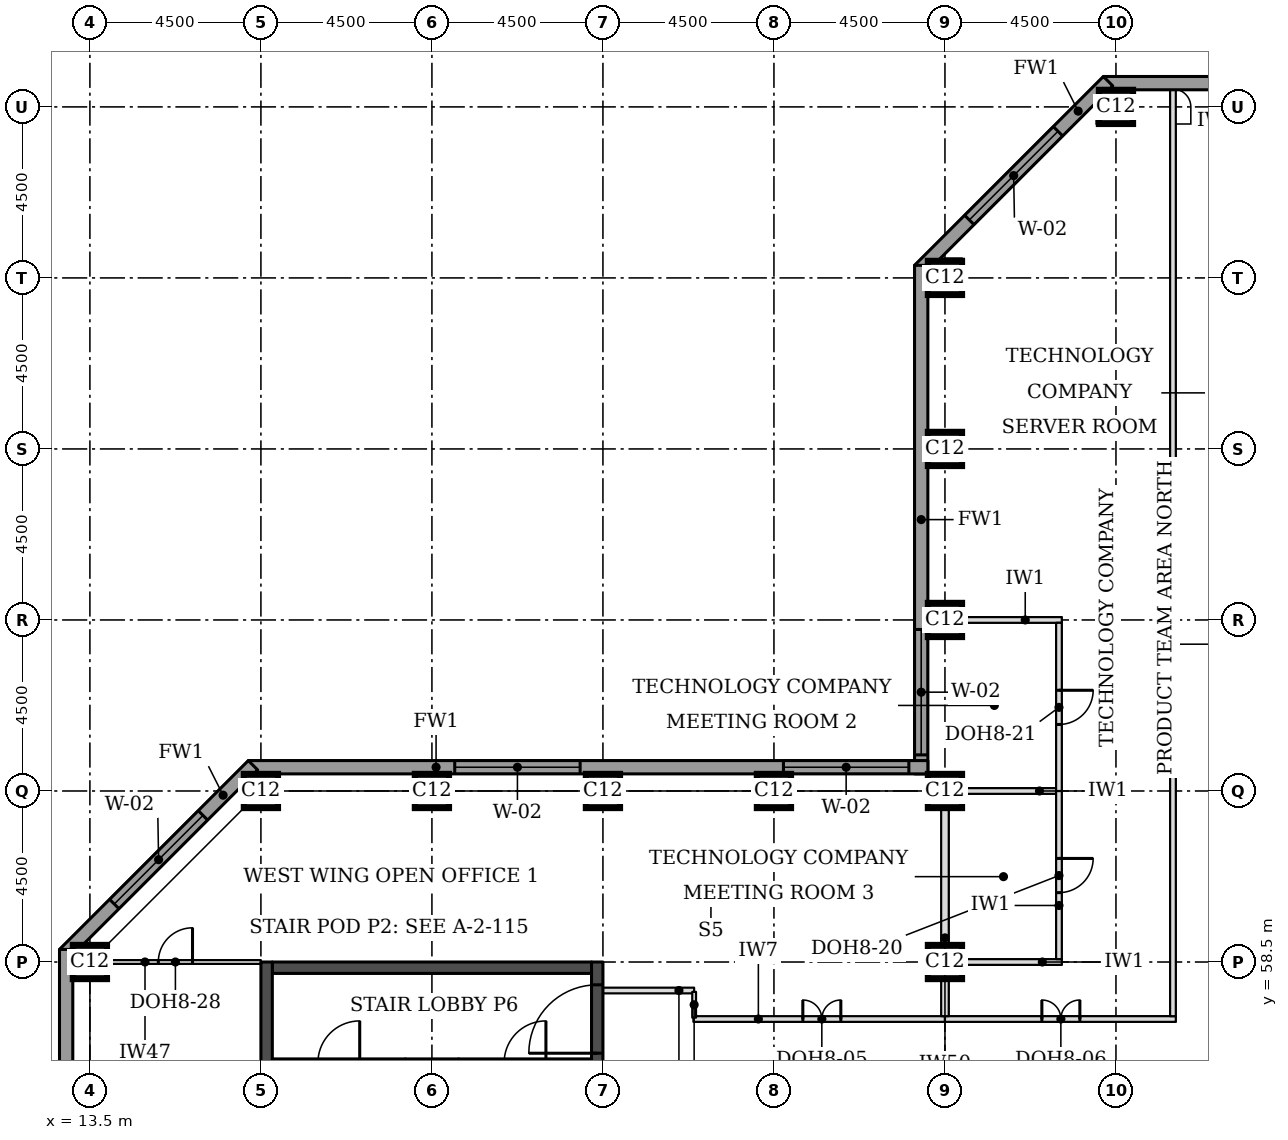
"""IFC4 building model, lengths in metres.
Left out: names, types, materials, properties, quantities, classifications, styles, units other than length and angle.
Written with IfcOpenShell. Run it as: python <this file> out.ifc"""

import sys

from ifc_helpers import new_model, si_unit, direction, frame, frame_2d, origin, origin_2d, place, context, subcontext, project, spatial, rectangle, extrude, element, fill, save


model = new_model("IFC4")
c1 = context("Model", 3, precision=1e-05, world=origin(), true_north=direction((0.0, 1.0)))
c2 = subcontext(c1, "Body", "Model", "MODEL_VIEW")
j1 = project(units=[si_unit("LENGTHUNIT", "METRE"), si_unit("PLANEANGLEUNIT", "RADIAN")], contexts=[c1])
p1 = place(None, origin())
s1 = spatial("IfcSite", under=j1, at=p1, CompositionType="ELEMENT")
p2 = place(p1, origin())
s2 = spatial("IfcBuilding", under=s1, at=p2, CompositionType="ELEMENT")
p3 = place(p2, frame((0.0, 0.0, 203.2)))
s3 = spatial("IfcBuildingStorey", under=s2, at=p3, CompositionType="ELEMENT", Elevation=203.2)
for number, where, z_axis, x_axis in (
    (1, (13.5, 58.5, 0.0), (0.0, 0.0, 1.0), (1.0, 0.0, 0.0)),
    (2, (36.0, 58.5, 0.0), (0.0, 0.0, 1.0), (1.0, 0.0, 0.0)),
    (3, (18.0, 63.0, 0.0), (0.0, 0.0, 1.0), (1.0, 0.0, 0.0)),
    (4, (22.5, 63.0, 0.0), (0.0, 0.0, 1.0), (1.0, 0.0, 0.0)),
    (5, (27.0, 63.0, 0.0), (0.0, 0.0, 1.0), (1.0, 0.0, 0.0)),
    (6, (31.5, 63.0, 0.0), (0.0, 0.0, 1.0), (1.0, 0.0, 0.0)),
    (7, (36.0, 63.0, 0.0), (0.0, 0.0, 1.0), (1.0, 0.0, 0.0)),
    (8, (36.0, 67.5, 0.0), (0.0, 0.0, 1.0), (1.0, 0.0, 0.0)),
    (9, (36.0, 72.0, 0.0), (0.0, 0.0, 1.0), (1.0, 0.0, 0.0)),
    (10, (36.0, 76.5, 0.0), (0.0, 0.0, 1.0), (1.0, 0.0, 0.0)),
    (11, (40.5, 81.0, 0.0), (0.0, 0.0, 1.0), (1.0, 0.0, 0.0)),
):
    element("IfcColumn", number, at=place(p3, frame(where, z_axis=z_axis, x_axis=x_axis)), inside=s3, PredefinedType="COLUMN", context=c2, shape_type="SweptSolid", body=[
        extrude(rectangle(XDim=0.9, YDim=0.9, at=origin_2d()), origin(), (0.0, 0.0, 1.0), 3.7),
    ])
p4 = place(p3, frame((18.3, 58.35, 0.0), z_axis=(0.0, 0.0, 1.0), x_axis=(1.0, 0.0, 0.0)))
e12 = element("IfcWall", 12, at=p4, inside=s3, PredefinedType="SHEAR", context=c2, shape_type="SweptSolid", body=[
    extrude(rectangle(XDim=8.4, YDim=0.3, at=frame_2d((4.2, 0.0))), origin(), (0.0, 0.0, 1.0), 3.7),
])
p5 = place(p3, frame((18.15, 49.5, 0.0), z_axis=(0.0, 0.0, 1.0), x_axis=(0.0, 1.0, 0.0)))
e13 = element("IfcWall", 13, at=p5, inside=s3, PredefinedType="SHEAR", context=c2, shape_type="SweptSolid", body=[
    extrude(rectangle(XDim=9.0, YDim=0.3, at=frame_2d((4.5, 0.0))), origin(), (0.0, 0.0, 1.0), 3.7),
])
p6 = place(p3, frame((26.85, 49.5, 0.0), z_axis=(0.0, 0.0, 1.0), x_axis=(0.0, 1.0, 0.0)))
e14 = element("IfcWall", 14, at=p6, inside=s3, PredefinedType="SHEAR", context=c2, shape_type="SweptSolid", body=[
    extrude(rectangle(XDim=9.0, YDim=0.3, at=frame_2d((4.5, 0.0))), origin(), (0.0, 0.0, 1.0), 3.7),
])
p7 = place(p6, frame((6.6, 0.0, 0.0)))
e15 = element("IfcOpeningElement", 15, at=p7, cuts=e14, PredefinedType="OPENING", context=c2, shape_type="SweptSolid", body=[
    extrude(rectangle(XDim=1.8, YDim=2.1, at=frame_2d((0.9, 1.05))), frame((0.0, 0.16, 0.0), z_axis=(0.0, -1.0, 0.0), x_axis=(1.0, 0.0, 0.0)), (0.0, 0.0, 1.0), 0.32),
])
p8 = place(p3, frame((72.331, 81.625, 0.0), z_axis=(0.0, 0.0, 1.0), x_axis=(-1.0, 0.0, 0.0)))
e16 = element("IfcWall", 16, at=p8, inside=s3, PredefinedType="STANDARD", context=c2, shape_type="SweptSolid", body=[
    extrude(rectangle(XDim=32.163, YDim=0.35, at=frame_2d((16.081, 0.0))), origin(), (0.0, 0.0, 1.0), 3.525),
])
p9 = place(p8, frame((5.431, 0.0, 0.9)))
e17 = element("IfcOpeningElement", 17, at=p9, cuts=e16, PredefinedType="OPENING", context=c2, shape_type="SweptSolid", body=[
    extrude(rectangle(XDim=3.3, YDim=1.9, at=frame_2d((1.65, 0.95))), frame((0.0, 0.185, 0.0), z_axis=(0.0, -1.0, 0.0), x_axis=(1.0, 0.0, 0.0)), (0.0, 0.0, 1.0), 0.37),
])
p10 = place(p8, frame((9.931, 0.0, 0.9)))
e18 = element("IfcOpeningElement", 18, at=p10, cuts=e16, PredefinedType="OPENING", context=c2, shape_type="SweptSolid", body=[
    extrude(rectangle(XDim=3.3, YDim=1.9, at=frame_2d((1.65, 0.95))), frame((0.0, 0.185, 0.0), z_axis=(0.0, -1.0, 0.0), x_axis=(1.0, 0.0, 0.0)), (0.0, 0.0, 1.0), 0.37),
])
p11 = place(p8, frame((14.431, 0.0, 0.9)))
e19 = element("IfcOpeningElement", 19, at=p11, cuts=e16, PredefinedType="OPENING", context=c2, shape_type="SweptSolid", body=[
    extrude(rectangle(XDim=3.3, YDim=1.9, at=frame_2d((1.65, 0.95))), frame((0.0, 0.185, 0.0), z_axis=(0.0, -1.0, 0.0), x_axis=(1.0, 0.0, 0.0)), (0.0, 0.0, 1.0), 0.37),
])
p12 = place(p8, frame((18.931, 0.0, 0.9)))
e20 = element("IfcOpeningElement", 20, at=p12, cuts=e16, PredefinedType="OPENING", context=c2, shape_type="SweptSolid", body=[
    extrude(rectangle(XDim=3.3, YDim=1.9, at=frame_2d((1.65, 0.95))), frame((0.0, 0.185, 0.0), z_axis=(0.0, -1.0, 0.0), x_axis=(1.0, 0.0, 0.0)), (0.0, 0.0, 1.0), 0.37),
])
p13 = place(p8, frame((23.431, 0.0, 0.9)))
e21 = element("IfcOpeningElement", 21, at=p13, cuts=e16, PredefinedType="OPENING", context=c2, shape_type="SweptSolid", body=[
    extrude(rectangle(XDim=3.3, YDim=1.9, at=frame_2d((1.65, 0.95))), frame((0.0, 0.185, 0.0), z_axis=(0.0, -1.0, 0.0), x_axis=(1.0, 0.0, 0.0)), (0.0, 0.0, 1.0), 0.37),
])
p14 = place(p3, frame((40.292, 81.676, 0.0), z_axis=(0.0, 0.0, 1.0), x_axis=(-0.707106781187, -0.707106781187, 0.0)))
e22 = element("IfcWall", 22, at=p14, inside=s3, PredefinedType="STANDARD", context=c2, shape_type="SweptSolid", body=[
    extrude(rectangle(XDim=7.027, YDim=0.35, at=frame_2d((3.513, 0.0))), origin(), (0.0, 0.0, 1.0), 3.525),
])
p15 = place(p14, frame((1.863, 0.0, 0.9)))
e23 = element("IfcOpeningElement", 23, at=p15, cuts=e22, PredefinedType="OPENING", context=c2, shape_type="SweptSolid", body=[
    extrude(rectangle(XDim=3.3, YDim=1.9, at=frame_2d((1.65, 0.95))), frame((0.0, 0.185, 0.0), z_axis=(0.0, -1.0, 0.0), x_axis=(1.0, 0.0, 0.0)), (0.0, 0.0, 1.0), 0.37),
])
p16 = place(p3, frame((35.375, 76.831, 0.0), z_axis=(0.0, 0.0, 1.0), x_axis=(0.0, -1.0, 0.0)))
e24 = element("IfcWall", 24, at=p16, inside=s3, PredefinedType="STANDARD", context=c2, shape_type="SweptSolid", body=[
    extrude(rectangle(XDim=13.381, YDim=0.35, at=frame_2d((6.691, 0.0))), origin(), (0.0, 0.0, 1.0), 3.525),
])
p17 = place(p16, frame((9.581, 0.0, 0.9)))
e25 = element("IfcOpeningElement", 25, at=p17, cuts=e24, PredefinedType="OPENING", context=c2, shape_type="SweptSolid", body=[
    extrude(rectangle(XDim=3.3, YDim=1.9, at=frame_2d((1.65, 0.95))), frame((0.0, 0.185, 0.0), z_axis=(0.0, -1.0, 0.0), x_axis=(1.0, 0.0, 0.0)), (0.0, 0.0, 1.0), 0.37),
])
p18 = place(p3, frame((35.55, 63.625, 0.0), z_axis=(0.0, 0.0, 1.0), x_axis=(-1.0, 0.0, 0.0)))
e26 = element("IfcWall", 26, at=p18, inside=s3, PredefinedType="STANDARD", context=c2, shape_type="SweptSolid", body=[
    extrude(rectangle(XDim=17.881, YDim=0.35, at=frame_2d((8.941, 0.0))), origin(), (0.0, 0.0, 1.0), 3.525),
])
p19 = place(p18, frame((0.5, 0.0, 0.9)))
e27 = element("IfcOpeningElement", 27, at=p19, cuts=e26, PredefinedType="OPENING", context=c2, shape_type="SweptSolid", body=[
    extrude(rectangle(XDim=3.3, YDim=1.9, at=frame_2d((1.65, 0.95))), frame((0.0, 0.185, 0.0), z_axis=(0.0, -1.0, 0.0), x_axis=(1.0, 0.0, 0.0)), (0.0, 0.0, 1.0), 0.37),
])
p20 = place(p18, frame((9.15, 0.0, 0.9)))
e28 = element("IfcOpeningElement", 28, at=p20, cuts=e26, PredefinedType="OPENING", context=c2, shape_type="SweptSolid", body=[
    extrude(rectangle(XDim=3.3, YDim=1.9, at=frame_2d((1.65, 0.95))), frame((0.0, 0.185, 0.0), z_axis=(0.0, -1.0, 0.0), x_axis=(1.0, 0.0, 0.0)), (0.0, 0.0, 1.0), 0.37),
])
p21 = place(p3, frame((17.792, 63.676, 0.0), z_axis=(0.0, 0.0, 1.0), x_axis=(-0.707106781187, -0.707106781187, 0.0)))
e29 = element("IfcWall", 29, at=p21, inside=s3, PredefinedType="STANDARD", context=c2, shape_type="SweptSolid", body=[
    extrude(rectangle(XDim=7.027, YDim=0.35, at=frame_2d((3.513, 0.0))), origin(), (0.0, 0.0, 1.0), 3.525),
])
p22 = place(p21, frame((1.863, 0.0, 0.9)))
e30 = element("IfcOpeningElement", 30, at=p22, cuts=e29, PredefinedType="OPENING", context=c2, shape_type="SweptSolid", body=[
    extrude(rectangle(XDim=3.3, YDim=1.9, at=frame_2d((1.65, 0.95))), frame((0.0, 0.185, 0.0), z_axis=(0.0, -1.0, 0.0), x_axis=(1.0, 0.0, 0.0)), (0.0, 0.0, 1.0), 0.37),
])
p23 = place(p3, frame((12.875, 58.831, 0.0), z_axis=(0.0, 0.0, 1.0), x_axis=(0.0, -1.0, 0.0)))
e31 = element("IfcWall", 31, at=p23, inside=s3, PredefinedType="STANDARD", context=c2, shape_type="SweptSolid", body=[
    extrude(rectangle(XDim=14.163, YDim=0.35, at=frame_2d((7.081, 0.0))), origin(), (0.0, 0.0, 1.0), 3.525),
])
p24 = place(p23, frame((5.431, 0.0, 0.9)))
e32 = element("IfcOpeningElement", 32, at=p24, cuts=e31, PredefinedType="OPENING", context=c2, shape_type="SweptSolid", body=[
    extrude(rectangle(XDim=3.3, YDim=1.9, at=frame_2d((1.65, 0.95))), frame((0.0, 0.185, 0.0), z_axis=(0.0, -1.0, 0.0), x_axis=(1.0, 0.0, 0.0)), (0.0, 0.0, 1.0), 0.37),
])
p25 = place(p3, frame((29.38, 57.0, 0.0), z_axis=(0.0, 0.0, 1.0), x_axis=(1.0, 0.0, 0.0)))
e33 = element("IfcWall", 33, at=p25, inside=s3, PredefinedType="PARTITIONING", context=c2, shape_type="SweptSolid", body=[
    extrude(rectangle(XDim=6.62, YDim=0.15, at=frame_2d((3.31, 0.0))), origin(), (0.0, 0.0, 1.0), 3.55),
])
p26 = place(p25, frame((2.88, 0.0, 0.0)))
e34 = element("IfcOpeningElement", 34, at=p26, cuts=e33, PredefinedType="OPENING", context=c2, shape_type="SweptSolid", body=[
    extrude(rectangle(XDim=1.0, YDim=2.1, at=frame_2d((0.5, 1.05))), frame((0.0, 0.085, 0.0), z_axis=(0.0, -1.0, 0.0), x_axis=(1.0, 0.0, 0.0)), (0.0, 0.0, 1.0), 0.17),
])
p27 = place(p3, frame((36.0, 57.0, 0.0), z_axis=(0.0, 0.0, 1.0), x_axis=(1.0, 0.0, 0.0)))
e35 = element("IfcWall", 35, at=p27, inside=s3, PredefinedType="PARTITIONING", context=c2, shape_type="SweptSolid", body=[
    extrude(rectangle(XDim=6.075, YDim=0.15, at=frame_2d((3.038, 0.0))), origin(), (0.0, 0.0, 1.0), 3.55),
])
p28 = place(p27, frame((2.55, 0.0, 0.0)))
e36 = element("IfcOpeningElement", 36, at=p28, cuts=e35, PredefinedType="OPENING", context=c2, shape_type="SweptSolid", body=[
    extrude(rectangle(XDim=1.0, YDim=2.1, at=frame_2d((0.5, 1.05))), frame((0.0, 0.085, 0.0), z_axis=(0.0, -1.0, 0.0), x_axis=(1.0, 0.0, 0.0)), (0.0, 0.0, 1.0), 0.17),
])
p29 = place(p3, frame((36.45, 58.5, 0.0), z_axis=(0.0, 0.0, 1.0), x_axis=(1.0, 0.0, 0.0)))
e37 = element("IfcWall", 37, at=p29, inside=s3, PredefinedType="PARTITIONING", context=c2, shape_type="SweptSolid", body=[
    extrude(rectangle(XDim=2.625, YDim=0.15, at=frame_2d((1.312, 0.0))), origin(), (0.0, 0.0, 1.0), 3.55),
])
p30 = place(p3, frame((36.45, 63.0, 0.0), z_axis=(0.0, 0.0, 1.0), x_axis=(1.0, 0.0, 0.0)))
e38 = element("IfcWall", 38, at=p30, inside=s3, PredefinedType="PARTITIONING", context=c2, shape_type="SweptSolid", body=[
    extrude(rectangle(XDim=2.475, YDim=0.15, at=frame_2d((1.238, 0.0))), origin(), (0.0, 0.0, 1.0), 3.55),
])
p31 = place(p3, frame((35.55, 67.5, 0.0), z_axis=(0.0, 0.0, 1.0), x_axis=(1.0, 0.0, 0.0)))
e39 = element("IfcWall", 39, at=p31, inside=s3, PredefinedType="PARTITIONING", context=c2, shape_type="SweptSolid", body=[
    extrude(rectangle(XDim=3.525, YDim=0.15, at=frame_2d((1.762, 0.0))), origin(), (0.0, 0.0, 1.0), 3.55),
])
p32 = place(p3, frame((36.0, 57.075, 0.0), z_axis=(0.0, 0.0, 1.0), x_axis=(0.0, 1.0, 0.0)))
e40 = element("IfcWall", 40, at=p32, inside=s3, PredefinedType="PARTITIONING", context=c2, shape_type="SweptSolid", body=[
    extrude(rectangle(XDim=0.975, YDim=0.2, at=frame_2d((0.488, 0.0))), origin(), (0.0, 0.0, 1.0), 2.8),
])
p33 = place(p3, frame((42.0, 57.075, 0.0), z_axis=(0.0, 0.0, 1.0), x_axis=(0.0, 1.0, 0.0)))
e41 = element("IfcWall", 41, at=p33, inside=s3, PredefinedType="PARTITIONING", context=c2, shape_type="SweptSolid", body=[
    extrude(rectangle(XDim=24.375, YDim=0.15, at=frame_2d((12.188, 0.0))), origin(), (0.0, 0.0, 1.0), 3.55),
])
p34 = place(p3, frame((39.0, 58.575, 0.0), z_axis=(0.0, 0.0, 1.0), x_axis=(0.0, 1.0, 0.0)))
e42 = element("IfcWall", 42, at=p34, inside=s3, PredefinedType="PARTITIONING", context=c2, shape_type="SweptSolid", body=[
    extrude(rectangle(XDim=4.425, YDim=0.15, at=frame_2d((2.212, 0.0))), origin(), (0.0, 0.0, 1.0), 3.55),
])
p35 = place(p34, frame((1.75, 0.0, 0.0)))
e43 = element("IfcOpeningElement", 43, at=p35, cuts=e42, PredefinedType="OPENING", context=c2, shape_type="SweptSolid", body=[
    extrude(rectangle(XDim=0.9, YDim=2.1, at=frame_2d((0.45, 1.05))), frame((0.0, 0.085, 0.0), z_axis=(0.0, -1.0, 0.0), x_axis=(1.0, 0.0, 0.0)), (0.0, 0.0, 1.0), 0.17),
])
p36 = place(p3, frame((36.0, 58.92, 0.0), z_axis=(0.0, 0.0, 1.0), x_axis=(0.0, 1.0, 0.0)))
e44 = element("IfcWall", 44, at=p36, inside=s3, PredefinedType="PARTITIONING", context=c2, shape_type="SweptSolid", body=[
    extrude(rectangle(XDim=3.63, YDim=0.2, at=frame_2d((1.815, 0.0))), origin(), (0.0, 0.0, 1.0), 2.8),
])
p37 = place(p3, frame((39.0, 63.0, 0.0), z_axis=(0.0, 0.0, 1.0), x_axis=(0.0, 1.0, 0.0)))
e45 = element("IfcWall", 45, at=p37, inside=s3, PredefinedType="PARTITIONING", context=c2, shape_type="SweptSolid", body=[
    extrude(rectangle(XDim=4.425, YDim=0.15, at=frame_2d((2.212, 0.0))), origin(), (0.0, 0.0, 1.0), 3.55),
])
p38 = place(p37, frame((1.75, 0.0, 0.0)))
e46 = element("IfcOpeningElement", 46, at=p38, cuts=e45, PredefinedType="OPENING", context=c2, shape_type="SweptSolid", body=[
    extrude(rectangle(XDim=0.9, YDim=2.1, at=frame_2d((0.45, 1.05))), frame((0.0, 0.085, 0.0), z_axis=(0.0, -1.0, 0.0), x_axis=(1.0, 0.0, 0.0)), (0.0, 0.0, 1.0), 0.17),
])
p39 = place(p3, frame((13.5, 58.5, 0.0), z_axis=(0.0, 0.0, 1.0), x_axis=(1.0, 0.0, 0.0)))
e47 = element("IfcWall", 47, at=p39, inside=s3, PredefinedType="PARTITIONING", context=c2, shape_type="SweptSolid", body=[
    extrude(rectangle(XDim=4.5, YDim=0.1, at=frame_2d((2.25, 0.0))), origin(), (0.0, 0.0, 1.0), 2.55),
])
p40 = place(p39, frame((1.8, 0.0, 0.0)))
e48 = element("IfcOpeningElement", 48, at=p40, cuts=e47, PredefinedType="OPENING", context=c2, shape_type="SweptSolid", body=[
    extrude(rectangle(XDim=0.9, YDim=2.1, at=frame_2d((0.45, 1.05))), frame((0.0, 0.06, 0.0), z_axis=(0.0, -1.0, 0.0), x_axis=(1.0, 0.0, 0.0)), (0.0, 0.0, 1.0), 0.12),
])
p41 = place(p3, frame((27.0, 57.75, 0.0), z_axis=(0.0, 0.0, 1.0), x_axis=(1.0, 0.0, 0.0)))
e49 = element("IfcWall", 49, at=p41, inside=s3, PredefinedType="PARTITIONING", context=c2, shape_type="SweptSolid", body=[
    extrude(rectangle(XDim=2.4, YDim=0.15, at=frame_2d((1.2, 0.0))), origin(), (0.0, 0.0, 1.0), 3.55),
])
p42 = place(p3, frame((29.4, 57.715, 0.0), z_axis=(0.0, 0.0, 1.0), x_axis=(0.0, -1.0, 0.0)))
e50 = element("IfcWall", 50, at=p42, inside=s3, PredefinedType="PARTITIONING", context=c2, shape_type="SweptSolid", body=[
    extrude(rectangle(XDim=0.68, YDim=0.1, at=frame_2d((0.34, 0.0))), origin(), (0.0, 0.0, 1.0), 3.55),
])
p43 = place(p3, frame((21.8, 55.85, 0.0), z_axis=(0.0, 0.0, 1.0), x_axis=(1.0, 0.0, 0.0)))
e51 = element("IfcWall", 51, at=p43, inside=s3, PredefinedType="SOLIDWALL", context=c2, shape_type="SweptSolid", body=[
    extrude(rectangle(XDim=1.4, YDim=0.2, at=frame_2d((0.7, 0.0))), origin(), (0.0, 0.0, 1.0), 3.55),
])
p44 = place(p3, frame((18.3, 55.85, 0.0), z_axis=(0.0, 0.0, 1.0), x_axis=(1.0, 0.0, 0.0)))
e52 = element("IfcWall", 52, at=p44, inside=s3, PredefinedType="SOLIDWALL", context=c2, shape_type="SweptSolid", body=[
    extrude(rectangle(XDim=3.5, YDim=0.2, at=frame_2d((1.75, 0.0))), origin(), (0.0, 0.0, 1.0), 3.55),
])
p45 = place(p44, frame((1.2, 0.0, 0.0)))
e53 = element("IfcOpeningElement", 53, at=p45, cuts=e52, PredefinedType="OPENING", context=c2, shape_type="SweptSolid", body=[
    extrude(rectangle(XDim=1.1, YDim=2.1, at=frame_2d((0.55, 1.05))), frame((0.0, 0.11, 0.0), z_axis=(0.0, -1.0, 0.0), x_axis=(1.0, 0.0, 0.0)), (0.0, 0.0, 1.0), 0.22),
])
p46 = place(p3, frame((23.2, 55.85, 0.0), z_axis=(0.0, 0.0, 1.0), x_axis=(1.0, 0.0, 0.0)))
e54 = element("IfcWall", 54, at=p46, inside=s3, PredefinedType="SOLIDWALL", context=c2, shape_type="SweptSolid", body=[
    extrude(rectangle(XDim=3.5, YDim=0.2, at=frame_2d((1.75, 0.0))), origin(), (0.0, 0.0, 1.0), 3.55),
])
p47 = place(p46, frame((1.2, 0.0, 0.0)))
e55 = element("IfcOpeningElement", 55, at=p47, cuts=e54, PredefinedType="OPENING", context=c2, shape_type="SweptSolid", body=[
    extrude(rectangle(XDim=1.1, YDim=2.1, at=frame_2d((0.55, 1.05))), frame((0.0, 0.11, 0.0), z_axis=(0.0, -1.0, 0.0), x_axis=(1.0, 0.0, 0.0)), (0.0, 0.0, 1.0), 0.22),
])
p48 = place(p15, origin())
e56 = element("IfcWindow", 56, at=p48, inside=s3, PartitioningType="SINGLE_PANEL", PredefinedType="WINDOW", context=c2, shape_type="SweptSolid", body=[
    extrude(rectangle(XDim=3.3, YDim=1.9, at=frame_2d((1.65, 0.95))), frame((0.0, 0.085, 0.0), z_axis=(0.0, -1.0, 0.0), x_axis=(1.0, 0.0, 0.0)), (0.0, 0.0, 1.0), 0.06),
])
fill(e23, e56)
p49 = place(p17, origin())
e57 = element("IfcWindow", 57, at=p49, inside=s3, PartitioningType="SINGLE_PANEL", PredefinedType="WINDOW", context=c2, shape_type="SweptSolid", body=[
    extrude(rectangle(XDim=3.3, YDim=1.9, at=frame_2d((1.65, 0.95))), frame((0.0, 0.085, 0.0), z_axis=(0.0, -1.0, 0.0), x_axis=(1.0, 0.0, 0.0)), (0.0, 0.0, 1.0), 0.06),
])
fill(e25, e57)
p50 = place(p19, origin())
e58 = element("IfcWindow", 58, at=p50, inside=s3, PartitioningType="SINGLE_PANEL", PredefinedType="WINDOW", context=c2, shape_type="SweptSolid", body=[
    extrude(rectangle(XDim=3.3, YDim=1.9, at=frame_2d((1.65, 0.95))), frame((0.0, 0.085, 0.0), z_axis=(0.0, -1.0, 0.0), x_axis=(1.0, 0.0, 0.0)), (0.0, 0.0, 1.0), 0.06),
])
fill(e27, e58)
p51 = place(p20, origin())
e59 = element("IfcWindow", 59, at=p51, inside=s3, PartitioningType="SINGLE_PANEL", PredefinedType="WINDOW", context=c2, shape_type="SweptSolid", body=[
    extrude(rectangle(XDim=3.3, YDim=1.9, at=frame_2d((1.65, 0.95))), frame((0.0, 0.085, 0.0), z_axis=(0.0, -1.0, 0.0), x_axis=(1.0, 0.0, 0.0)), (0.0, 0.0, 1.0), 0.06),
])
fill(e28, e59)
p52 = place(p22, origin())
e60 = element("IfcWindow", 60, at=p52, inside=s3, PartitioningType="SINGLE_PANEL", PredefinedType="WINDOW", context=c2, shape_type="SweptSolid", body=[
    extrude(rectangle(XDim=3.3, YDim=1.9, at=frame_2d((1.65, 0.95))), frame((0.0, 0.085, 0.0), z_axis=(0.0, -1.0, 0.0), x_axis=(1.0, 0.0, 0.0)), (0.0, 0.0, 1.0), 0.06),
])
fill(e30, e60)
p53 = place(p28, origin())
e61 = element("IfcDoor", 61, at=p53, inside=s3, OperationType="DOUBLE_DOOR_SINGLE_SWING", PredefinedType="DOOR", context=c2, shape_type="SweptSolid", body=[
    extrude(rectangle(XDim=1.0, YDim=2.1, at=frame_2d((0.5, 1.05))), frame((0.0, 0.025, 0.0), z_axis=(0.0, -1.0, 0.0), x_axis=(1.0, 0.0, 0.0)), (0.0, 0.0, 1.0), 0.05),
])
fill(e36, e61)
p54 = place(p35, frame((0.9, 0.0, 0.0), z_axis=(0.0, 0.0, 1.0), x_axis=(-1.0, 0.0, 0.0)))
e62 = element("IfcDoor", 62, at=p54, inside=s3, OperationType="SINGLE_SWING_LEFT", PredefinedType="DOOR", context=c2, shape_type="SweptSolid", body=[
    extrude(rectangle(XDim=0.9, YDim=2.1, at=frame_2d((0.45, 1.05))), frame((0.0, 0.025, 0.0), z_axis=(0.0, -1.0, 0.0), x_axis=(1.0, 0.0, 0.0)), (0.0, 0.0, 1.0), 0.05),
])
fill(e43, e62)
p55 = place(p38, frame((0.9, 0.0, 0.0), z_axis=(0.0, 0.0, 1.0), x_axis=(-1.0, 0.0, 0.0)))
e63 = element("IfcDoor", 63, at=p55, inside=s3, OperationType="SINGLE_SWING_LEFT", PredefinedType="DOOR", context=c2, shape_type="SweptSolid", body=[
    extrude(rectangle(XDim=0.9, YDim=2.1, at=frame_2d((0.45, 1.05))), frame((0.0, 0.025, 0.0), z_axis=(0.0, -1.0, 0.0), x_axis=(1.0, 0.0, 0.0)), (0.0, 0.0, 1.0), 0.05),
])
fill(e46, e63)
p56 = place(p26, origin())
e64 = element("IfcDoor", 64, at=p56, inside=s3, OperationType="DOUBLE_DOOR_SINGLE_SWING", PredefinedType="DOOR", context=c2, shape_type="SweptSolid", body=[
    extrude(rectangle(XDim=1.0, YDim=2.1, at=frame_2d((0.5, 1.05))), frame((0.0, 0.025, 0.0), z_axis=(0.0, -1.0, 0.0), x_axis=(1.0, 0.0, 0.0)), (0.0, 0.0, 1.0), 0.05),
])
fill(e34, e64)
p57 = place(p40, origin())
e65 = element("IfcDoor", 65, at=p57, inside=s3, OperationType="SINGLE_SWING_RIGHT", PredefinedType="DOOR", context=c2, shape_type="SweptSolid", body=[
    extrude(rectangle(XDim=0.9, YDim=2.1, at=frame_2d((0.45, 1.05))), frame((0.0, 0.025, 0.0), z_axis=(0.0, -1.0, 0.0), x_axis=(1.0, 0.0, 0.0)), (0.0, 0.0, 1.0), 0.05),
])
fill(e48, e65)
p58 = place(p7, origin())
e66 = element("IfcDoor", 66, at=p58, inside=s3, OperationType="SINGLE_SWING_LEFT", PredefinedType="DOOR", context=c2, shape_type="SweptSolid", body=[
    extrude(rectangle(XDim=1.8, YDim=2.1, at=frame_2d((0.9, 1.05))), frame((0.0, 0.025, 0.0), z_axis=(0.0, -1.0, 0.0), x_axis=(1.0, 0.0, 0.0)), (0.0, 0.0, 1.0), 0.05),
])
fill(e15, e66)
save(model, sys.argv[1])
